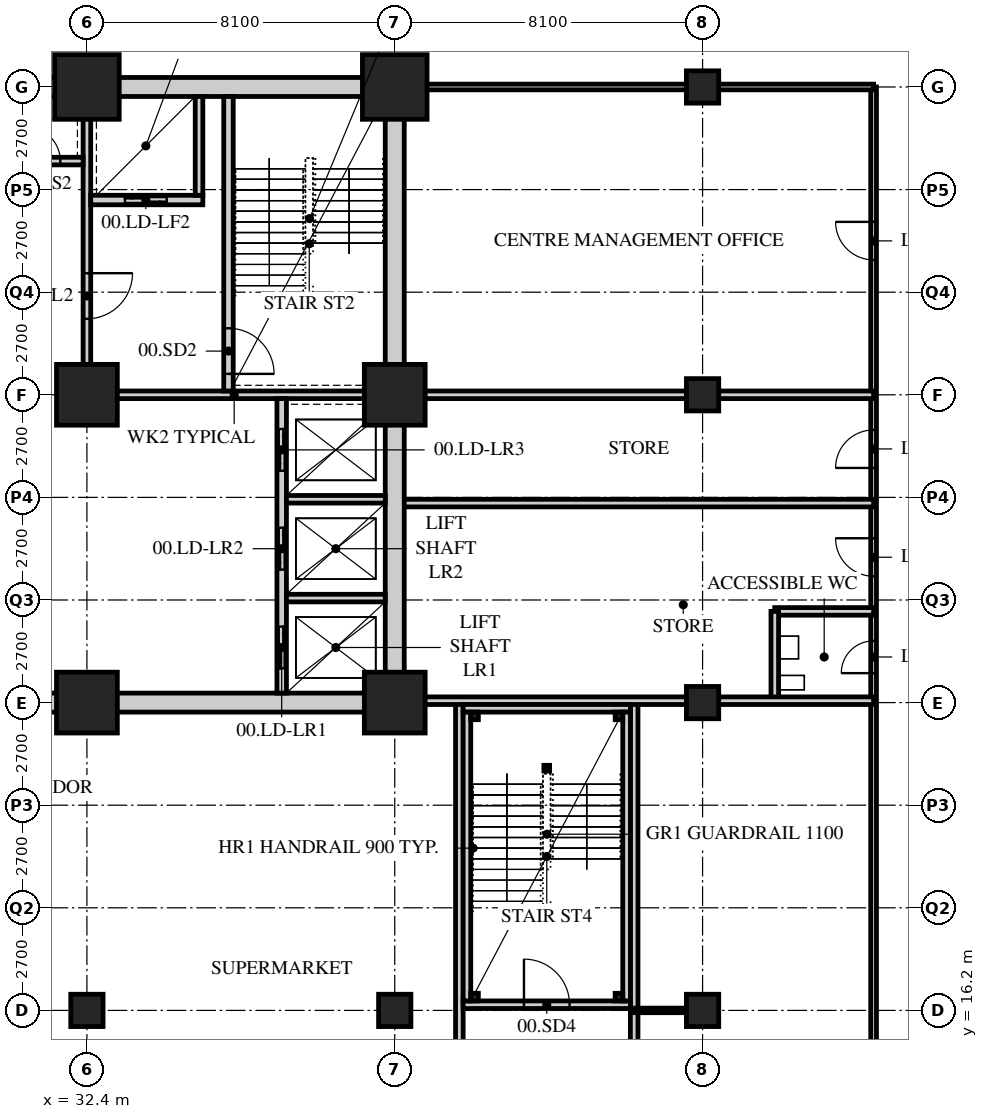
"""IFC4 building model, lengths in metres.
Left out: names, types, materials, properties, quantities, classifications, styles, units other than length and angle.
Written with IfcOpenShell. Run it as: python <this file> out.ifc"""

import sys

from ifc_helpers import new_model, si_unit, direction, frame, frame_2d, origin, origin_2d, place, context, subcontext, project, spatial, rectangle, hollow_rectangle, extrude, element, fill, save


model = new_model("IFC4")
c1 = context("Model", 3, precision=1e-05, world=origin(), true_north=direction((0.0, 1.0)))
c2 = subcontext(c1, "Body", "Model", "MODEL_VIEW")
j1 = project(units=[si_unit("LENGTHUNIT", "METRE"), si_unit("PLANEANGLEUNIT", "RADIAN")], contexts=[c1])
p1 = place(None, origin())
s1 = spatial("IfcSite", under=j1, at=p1, CompositionType="ELEMENT")
p2 = place(p1, origin())
s2 = spatial("IfcBuilding", under=s1, at=p2, CompositionType="ELEMENT")
p3 = place(p2, origin())
s3 = spatial("IfcBuildingStorey", under=s2, at=p3, CompositionType="ELEMENT", Elevation=0.0)
p4 = place(p3, frame((32.4, 16.2, 0.0), z_axis=(0.0, 0.0, 1.0), x_axis=(1.0, 0.0, 0.0)))
e1 = element("IfcColumn", 1, at=p4, inside=s3, PredefinedType="COLUMN", context=c2, shape_type="SweptSolid", body=[
    extrude(hollow_rectangle(XDim=0.85, YDim=0.85, WallThickness=0.085, at=origin_2d()), origin(), (0.0, 0.0, 1.0), 6.0),
])
for number, where, z_axis, x_axis in (
    (2, (32.4, 24.3, 0.0), (0.0, 0.0, 1.0), (1.0, 0.0, 0.0)),
    (3, (32.4, 32.4, 0.0), (0.0, 0.0, 1.0), (1.0, 0.0, 0.0)),
):
    element("IfcColumn", number, at=place(p3, frame(where, z_axis=z_axis, x_axis=x_axis)), inside=s3, PredefinedType="COLUMN", context=c2, shape_type="SweptSolid", body=[
        extrude(hollow_rectangle(XDim=1.6, YDim=1.6, WallThickness=0.15, at=origin_2d()), origin(), (0.0, 0.0, 1.0), 6.0),
    ])
p5 = place(p3, frame((32.4, 40.5, 0.0), z_axis=(0.0, 0.0, 1.0), x_axis=(1.0, 0.0, 0.0)))
e4 = element("IfcColumn", 4, at=p5, inside=s3, PredefinedType="COLUMN", context=c2, shape_type="SweptSolid", body=[
    extrude(hollow_rectangle(XDim=1.7, YDim=1.7, WallThickness=0.16, at=origin_2d()), origin(), (0.0, 0.0, 1.0), 6.0),
])
p6 = place(p3, frame((40.5, 16.2, 0.0), z_axis=(0.0, 0.0, 1.0), x_axis=(1.0, 0.0, 0.0)))
e5 = element("IfcColumn", 5, at=p6, inside=s3, PredefinedType="COLUMN", context=c2, shape_type="SweptSolid", body=[
    extrude(hollow_rectangle(XDim=0.85, YDim=0.85, WallThickness=0.085, at=origin_2d()), origin(), (0.0, 0.0, 1.0), 6.0),
])
for number, where, z_axis, x_axis in (
    (6, (40.5, 24.3, 0.0), (0.0, 0.0, 1.0), (1.0, 0.0, 0.0)),
    (7, (40.5, 32.4, 0.0), (0.0, 0.0, 1.0), (1.0, 0.0, 0.0)),
):
    element("IfcColumn", number, at=place(p3, frame(where, z_axis=z_axis, x_axis=x_axis)), inside=s3, PredefinedType="COLUMN", context=c2, shape_type="SweptSolid", body=[
        extrude(hollow_rectangle(XDim=1.6, YDim=1.6, WallThickness=0.15, at=origin_2d()), origin(), (0.0, 0.0, 1.0), 6.0),
    ])
p7 = place(p3, frame((40.5, 40.5, 0.0), z_axis=(0.0, 0.0, 1.0), x_axis=(1.0, 0.0, 0.0)))
e8 = element("IfcColumn", 8, at=p7, inside=s3, PredefinedType="COLUMN", context=c2, shape_type="SweptSolid", body=[
    extrude(hollow_rectangle(XDim=1.7, YDim=1.7, WallThickness=0.16, at=origin_2d()), origin(), (0.0, 0.0, 1.0), 6.0),
])
for number, where, z_axis, x_axis in (
    (9, (48.6, 16.2, 0.0), (0.0, 0.0, 1.0), (1.0, 0.0, 0.0)),
    (10, (48.6, 24.3, 0.0), (0.0, 0.0, 1.0), (1.0, 0.0, 0.0)),
    (11, (48.6, 32.4, 0.0), (0.0, 0.0, 1.0), (1.0, 0.0, 0.0)),
    (12, (48.6, 40.5, 0.0), (0.0, 0.0, 1.0), (1.0, 0.0, 0.0)),
):
    element("IfcColumn", number, at=place(p3, frame(where, z_axis=z_axis, x_axis=x_axis)), inside=s3, PredefinedType="COLUMN", context=c2, shape_type="SweptSolid", body=[
        extrude(hollow_rectangle(XDim=0.85, YDim=0.85, WallThickness=0.085, at=origin_2d()), origin(), (0.0, 0.0, 1.0), 6.0),
    ])
p8 = place(p3, frame((53.1, 3.6, 0.0), z_axis=(0.0, 0.0, 1.0), x_axis=(0.0, 1.0, 0.0)))
e13 = element("IfcWall", 13, at=p8, inside=s3, PredefinedType="PARTITIONING", context=c2, shape_type="SweptSolid", body=[
    extrude(rectangle(XDim=36.9, YDim=0.15, at=frame_2d((18.45, 0.0))), origin(), (0.0, 0.0, 1.0), 5.75),
])
p9 = place(p8, frame((21.475, 0.0, 0.0)))
e14 = element("IfcOpeningElement", 14, at=p9, cuts=e13, PredefinedType="OPENING", context=c2, shape_type="SweptSolid", body=[
    extrude(rectangle(XDim=0.85, YDim=2.1, at=frame_2d((0.425, 1.05))), frame((0.0, 0.085, 0.0), z_axis=(0.0, -1.0, 0.0), x_axis=(1.0, 0.0, 0.0)), (0.0, 0.0, 1.0), 0.17),
])
p10 = place(p8, frame((24.025, 0.0, 0.0)))
e15 = element("IfcOpeningElement", 15, at=p10, cuts=e13, PredefinedType="OPENING", context=c2, shape_type="SweptSolid", body=[
    extrude(rectangle(XDim=1.0, YDim=2.1, at=frame_2d((0.5, 1.05))), frame((0.0, 0.085, 0.0), z_axis=(0.0, -1.0, 0.0), x_axis=(1.0, 0.0, 0.0)), (0.0, 0.0, 1.0), 0.17),
])
p11 = place(p8, frame((26.875, 0.0, 0.0)))
e16 = element("IfcOpeningElement", 16, at=p11, cuts=e13, PredefinedType="OPENING", context=c2, shape_type="SweptSolid", body=[
    extrude(rectangle(XDim=1.0, YDim=2.1, at=frame_2d((0.5, 1.05))), frame((0.0, 0.085, 0.0), z_axis=(0.0, -1.0, 0.0), x_axis=(1.0, 0.0, 0.0)), (0.0, 0.0, 1.0), 0.17),
])
p12 = place(p8, frame((32.35, 0.0, 0.0)))
e17 = element("IfcOpeningElement", 17, at=p12, cuts=e13, PredefinedType="OPENING", context=c2, shape_type="SweptSolid", body=[
    extrude(rectangle(XDim=1.0, YDim=2.1, at=frame_2d((0.5, 1.05))), frame((0.0, 0.085, 0.0), z_axis=(0.0, -1.0, 0.0), x_axis=(1.0, 0.0, 0.0)), (0.0, 0.0, 1.0), 0.17),
])
p13 = place(p3, frame((53.1, 40.5, 0.0), z_axis=(0.0, 0.0, 1.0), x_axis=(-1.0, 0.0, 0.0)))
e18 = element("IfcWall", 18, at=p13, inside=s3, PredefinedType="PARTITIONING", context=c2, shape_type="SweptSolid", body=[
    extrude(rectangle(XDim=12.4, YDim=0.15, at=frame_2d((6.2, 0.0))), origin(), (0.0, 0.0, 1.0), 5.138),
])
p14 = place(p3, frame((40.5, 32.4, 0.0), z_axis=(0.0, 0.0, 1.0), x_axis=(1.0, 0.0, 0.0)))
e19 = element("IfcWall", 19, at=p14, inside=s3, PredefinedType="SOLIDWALL", context=c2, shape_type="SweptSolid", body=[
    extrude(rectangle(XDim=12.6, YDim=0.2, at=frame_2d((6.3, 0.0))), origin(), (0.0, 0.0, 1.0), 5.138),
])
p15 = place(p3, frame((53.1, 26.7, 0.0), z_axis=(0.0, 0.0, 1.0), x_axis=(-1.0, 0.0, 0.0)))
e20 = element("IfcWall", 20, at=p15, inside=s3, PredefinedType="SOLIDWALL", context=c2, shape_type="SweptSolid", body=[
    extrude(rectangle(XDim=2.6, YDim=0.2, at=frame_2d((1.3, 0.0))), origin(), (0.0, 0.0, 1.0), 5.75),
])
p16 = place(p3, frame((50.5, 24.3, 0.0), z_axis=(0.0, 0.0, 1.0), x_axis=(0.0, 1.0, 0.0)))
e21 = element("IfcWall", 21, at=p16, inside=s3, PredefinedType="SOLIDWALL", context=c2, shape_type="SweptSolid", body=[
    extrude(rectangle(XDim=2.4, YDim=0.2, at=frame_2d((1.2, 0.0))), origin(), (0.0, 0.0, 1.0), 5.75),
])
p17 = place(p3, frame((53.1, 29.55, 0.0), z_axis=(0.0, 0.0, 1.0), x_axis=(-1.0, 0.0, 0.0)))
e22 = element("IfcWall", 22, at=p17, inside=s3, PredefinedType="SOLIDWALL", context=c2, shape_type="SweptSolid", body=[
    extrude(rectangle(XDim=12.6, YDim=0.2, at=frame_2d((6.3, 0.0))), origin(), (0.0, 0.0, 1.0), 5.75),
])
for number, where, z_axis, x_axis in (
    (23, (42.2, 3.6, 0.0), (0.0, 0.0, 1.0), (0.0, 1.0, 0.0)),
    (24, (46.8, 3.6, 0.0), (0.0, 0.0, 1.0), (0.0, 1.0, 0.0)),
):
    element("IfcWall", number, at=place(p3, frame(where, z_axis=z_axis, x_axis=x_axis)), inside=s3, PredefinedType="SOLIDWALL", context=c2, shape_type="SweptSolid", body=[
        extrude(rectangle(XDim=20.7, YDim=0.2, at=frame_2d((10.35, 0.0))), origin(), (0.0, 0.0, 1.0), 5.75),
    ])
p18 = place(p3, frame((40.5, 24.35, 0.0), z_axis=(0.0, 0.0, 1.0), x_axis=(1.0, 0.0, 0.0)))
e25 = element("IfcWall", 25, at=p18, inside=s3, PredefinedType="SOLIDWALL", context=c2, shape_type="SweptSolid", body=[
    extrude(rectangle(XDim=12.6, YDim=0.2, at=frame_2d((6.3, 0.0))), origin(), (0.0, 0.0, 1.0), 5.138),
])
p19 = place(p3, frame((46.8, 16.2, 0.0), z_axis=(0.0, 0.0, 1.0), x_axis=(1.0, 0.0, 0.0)))
e26 = element("IfcWall", 26, at=p19, inside=s3, PredefinedType="PARTITIONING", context=c2, shape_type="SweptSolid", body=[
    extrude(rectangle(XDim=1.375, YDim=0.12, at=frame_2d((0.688, 0.0))), origin(), (0.0, 0.0, 1.0), 5.138),
])
p20 = place(p3, frame((15.95, 24.3, 0.0), z_axis=(0.0, 0.0, 1.0), x_axis=(1.0, 0.0, 0.0)))
e27 = element("IfcWall", 27, at=p20, inside=s3, PredefinedType="SOLIDWALL", context=c2, shape_type="SweptSolid", body=[
    extrude(rectangle(XDim=24.8, YDim=0.5, at=frame_2d((12.4, 0.0))), origin(), (0.0, 0.0, 1.0), 5.1),
])
p21 = place(p20, frame((11.5, 0.0, 0.0)))
e28 = element("IfcOpeningElement", 28, at=p21, cuts=e27, PredefinedType="OPENING", context=c2, shape_type="SweptSolid", body=[
    extrude(rectangle(XDim=1.8, YDim=2.4, at=frame_2d((0.9, 1.2))), frame((0.0, 0.26, 0.0), z_axis=(0.0, -1.0, 0.0), x_axis=(1.0, 0.0, 0.0)), (0.0, 0.0, 1.0), 0.52),
])
p22 = place(p3, frame((15.95, 40.5, 0.0), z_axis=(0.0, 0.0, 1.0), x_axis=(1.0, 0.0, 0.0)))
e29 = element("IfcWall", 29, at=p22, inside=s3, PredefinedType="SOLIDWALL", context=c2, shape_type="SweptSolid", body=[
    extrude(rectangle(XDim=24.8, YDim=0.5, at=frame_2d((12.4, 0.0))), origin(), (0.0, 0.0, 1.0), 5.1),
])
p23 = place(p22, frame((11.5, 0.0, 0.0)))
e30 = element("IfcOpeningElement", 30, at=p23, cuts=e29, PredefinedType="OPENING", context=c2, shape_type="SweptSolid", body=[
    extrude(rectangle(XDim=1.8, YDim=2.4, at=frame_2d((0.9, 1.2))), frame((0.0, 0.26, 0.0), z_axis=(0.0, -1.0, 0.0), x_axis=(1.0, 0.0, 0.0)), (0.0, 0.0, 1.0), 0.52),
])
p24 = place(p3, frame((40.5, 24.55, 0.0), z_axis=(0.0, 0.0, 1.0), x_axis=(0.0, 1.0, 0.0)))
e31 = element("IfcWall", 31, at=p24, inside=s3, PredefinedType="SOLIDWALL", context=c2, shape_type="SweptSolid", body=[
    extrude(rectangle(XDim=15.7, YDim=0.5, at=frame_2d((7.85, 0.0))), origin(), (0.0, 0.0, 1.0), 5.138),
])
p25 = place(p3, frame((32.3, 32.4, 0.0), z_axis=(0.0, 0.0, 1.0), x_axis=(1.0, 0.0, 0.0)))
e32 = element("IfcWall", 32, at=p25, inside=s3, PredefinedType="SOLIDWALL", context=c2, shape_type="SweptSolid", body=[
    extrude(rectangle(XDim=7.95, YDim=0.2, at=frame_2d((3.975, 0.0))), origin(), (0.0, 0.0, 1.0), 5.05),
])
p26 = place(p3, frame((32.4, 32.5, 0.0), z_axis=(0.0, 0.0, 1.0), x_axis=(0.0, 1.0, 0.0)))
e33 = element("IfcWall", 33, at=p26, inside=s3, PredefinedType="SOLIDWALL", context=c2, shape_type="SweptSolid", body=[
    extrude(rectangle(XDim=7.75, YDim=0.2, at=frame_2d((3.875, 0.0))), origin(), (0.0, 0.0, 1.0), 5.05),
])
p27 = place(p26, frame((1.9, 0.0, 0.0)))
e34 = element("IfcOpeningElement", 34, at=p27, cuts=e33, PredefinedType="OPENING", context=c2, shape_type="SweptSolid", body=[
    extrude(rectangle(XDim=1.2, YDim=2.1, at=frame_2d((0.6, 1.05))), frame((0.0, 0.11, 0.0), z_axis=(0.0, -1.0, 0.0), x_axis=(1.0, 0.0, 0.0)), (0.0, 0.0, 1.0), 0.22),
])
p28 = place(p3, frame((37.525, 24.55, 0.0), z_axis=(0.0, 0.0, 1.0), x_axis=(0.0, 1.0, 0.0)))
e35 = element("IfcWall", 35, at=p28, inside=s3, PredefinedType="SOLIDWALL", context=c2, shape_type="SweptSolid", body=[
    extrude(rectangle(XDim=7.75, YDim=0.25, at=frame_2d((3.875, 0.0))), origin(), (0.0, 0.0, 1.0), 5.75),
])
p29 = place(p28, frame((0.65, 0.0, 0.0)))
e36 = element("IfcOpeningElement", 36, at=p29, cuts=e35, PredefinedType="OPENING", context=c2, shape_type="SweptSolid", body=[
    extrude(rectangle(XDim=1.1, YDim=2.4, at=frame_2d((0.55, 1.2))), frame((0.0, 0.135, 0.0), z_axis=(0.0, -1.0, 0.0), x_axis=(1.0, 0.0, 0.0)), (0.0, 0.0, 1.0), 0.27),
])
p30 = place(p28, frame((3.25, 0.0, 0.0)))
e37 = element("IfcOpeningElement", 37, at=p30, cuts=e35, PredefinedType="OPENING", context=c2, shape_type="SweptSolid", body=[
    extrude(rectangle(XDim=1.1, YDim=2.4, at=frame_2d((0.55, 1.2))), frame((0.0, 0.135, 0.0), z_axis=(0.0, -1.0, 0.0), x_axis=(1.0, 0.0, 0.0)), (0.0, 0.0, 1.0), 0.27),
])
p31 = place(p28, frame((5.85, 0.0, 0.0)))
e38 = element("IfcOpeningElement", 38, at=p31, cuts=e35, PredefinedType="OPENING", context=c2, shape_type="SweptSolid", body=[
    extrude(rectangle(XDim=1.1, YDim=2.4, at=frame_2d((0.55, 1.2))), frame((0.0, 0.135, 0.0), z_axis=(0.0, -1.0, 0.0), x_axis=(1.0, 0.0, 0.0)), (0.0, 0.0, 1.0), 0.27),
])
for number, where, z_axis, x_axis in (
    (39, (37.65, 27.05, 0.0), (0.0, 0.0, 1.0), (1.0, 0.0, 0.0)),
    (40, (37.65, 29.65, 0.0), (0.0, 0.0, 1.0), (1.0, 0.0, 0.0)),
):
    element("IfcWall", number, at=place(p3, frame(where, z_axis=z_axis, x_axis=x_axis)), inside=s3, PredefinedType="SOLIDWALL", context=c2, shape_type="SweptSolid", body=[
        extrude(rectangle(XDim=2.6, YDim=0.2, at=frame_2d((1.3, 0.0))), origin(), (0.0, 0.0, 1.0), 5.75),
    ])
p32 = place(p3, frame((36.125, 32.5, 0.0), z_axis=(0.0, 0.0, 1.0), x_axis=(0.0, 1.0, 0.0)))
e41 = element("IfcWall", 41, at=p32, inside=s3, PredefinedType="SOLIDWALL", context=c2, shape_type="SweptSolid", body=[
    extrude(rectangle(XDim=7.75, YDim=0.25, at=frame_2d((3.875, 0.0))), origin(), (0.0, 0.0, 1.0), 5.75),
])
p33 = place(p32, frame((0.45, 0.0, 0.0)))
e42 = element("IfcOpeningElement", 42, at=p33, cuts=e41, PredefinedType="OPENING", context=c2, shape_type="SweptSolid", body=[
    extrude(rectangle(XDim=1.2, YDim=2.1, at=frame_2d((0.6, 1.05))), frame((0.0, 0.135, 0.0), z_axis=(0.0, -1.0, 0.0), x_axis=(1.0, 0.0, 0.0)), (0.0, 0.0, 1.0), 0.27),
])
p34 = place(p3, frame((32.5, 37.525, 0.0), z_axis=(0.0, 0.0, 1.0), x_axis=(1.0, 0.0, 0.0)))
e43 = element("IfcWall", 43, at=p34, inside=s3, PredefinedType="SOLIDWALL", context=c2, shape_type="SweptSolid", body=[
    extrude(rectangle(XDim=2.95, YDim=0.25, at=frame_2d((1.475, 0.0))), origin(), (0.0, 0.0, 1.0), 5.75),
])
p35 = place(p34, frame((0.9, 0.0, 0.0)))
e44 = element("IfcOpeningElement", 44, at=p35, cuts=e43, PredefinedType="OPENING", context=c2, shape_type="SweptSolid", body=[
    extrude(rectangle(XDim=1.1, YDim=2.4, at=frame_2d((0.55, 1.2))), frame((0.0, 0.135, 0.0), z_axis=(0.0, -1.0, 0.0), x_axis=(1.0, 0.0, 0.0)), (0.0, 0.0, 1.0), 0.27),
])
p36 = place(p3, frame((35.35, 37.65, 0.0), z_axis=(0.0, 0.0, 1.0), x_axis=(0.0, 1.0, 0.0)))
e45 = element("IfcWall", 45, at=p36, inside=s3, PredefinedType="SOLIDWALL", context=c2, shape_type="SweptSolid", body=[
    extrude(rectangle(XDim=2.6, YDim=0.2, at=frame_2d((1.3, 0.0))), origin(), (0.0, 0.0, 1.0), 5.75),
])
p37 = place(p3, frame((30.15, 38.55, 0.0), z_axis=(0.0, 0.0, 1.0), x_axis=(1.0, 0.0, 0.0)))
e46 = element("IfcWall", 46, at=p37, inside=s3, PredefinedType="SOLIDWALL", context=c2, shape_type="SweptSolid", body=[
    extrude(rectangle(XDim=2.15, YDim=0.2, at=frame_2d((1.075, 0.0))), origin(), (0.0, 0.0, 1.0), 5.75),
])
p38 = place(p37, frame((0.65, 0.0, 0.0)))
e47 = element("IfcOpeningElement", 47, at=p38, cuts=e46, PredefinedType="OPENING", context=c2, shape_type="SweptSolid", body=[
    extrude(rectangle(XDim=0.9, YDim=2.1, at=frame_2d((0.45, 1.05))), frame((0.0, 0.11, 0.0), z_axis=(0.0, -1.0, 0.0), x_axis=(1.0, 0.0, 0.0)), (0.0, 0.0, 1.0), 0.22),
])
p39 = place(p3, frame((42.3, 16.35, 0.0), z_axis=(0.0, 0.0, 1.0), x_axis=(1.0, 0.0, 0.0)))
e48 = element("IfcWall", 48, at=p39, inside=s3, PredefinedType="SOLIDWALL", context=c2, shape_type="SweptSolid", body=[
    extrude(rectangle(XDim=4.4, YDim=0.2, at=frame_2d((2.2, 0.0))), origin(), (0.0, 0.0, 1.0), 5.138),
])
p40 = place(p39, frame((1.6, 0.0, 0.0)))
e49 = element("IfcOpeningElement", 49, at=p40, cuts=e48, PredefinedType="OPENING", context=c2, shape_type="SweptSolid", body=[
    extrude(rectangle(XDim=1.2, YDim=2.1, at=frame_2d((0.6, 1.05))), frame((0.0, 0.11, 0.0), z_axis=(0.0, -1.0, 0.0), x_axis=(1.0, 0.0, 0.0)), (0.0, 0.0, 1.0), 0.22),
])
p41 = place(p3, frame((42.3, 24.15, 0.0), z_axis=(0.0, 0.0, 1.0), x_axis=(1.0, 0.0, 0.0)))
e50 = element("IfcWall", 50, at=p41, inside=s3, PredefinedType="SOLIDWALL", context=c2, shape_type="SweptSolid", body=[
    extrude(rectangle(XDim=4.4, YDim=0.2, at=frame_2d((2.2, 0.0))), origin(), (0.0, 0.0, 1.0), 5.138),
])
for number, where, z_axis, x_axis in (
    (51, (42.4, 16.45, 0.0), (0.0, 0.0, 1.0), (0.0, 1.0, 0.0)),
    (52, (46.6, 16.45, 0.0), (0.0, 0.0, 1.0), (0.0, 1.0, 0.0)),
):
    element("IfcWall", number, at=place(p3, frame(where, z_axis=z_axis, x_axis=x_axis)), inside=s3, PredefinedType="SOLIDWALL", context=c2, shape_type="SweptSolid", body=[
        extrude(rectangle(XDim=7.6, YDim=0.2, at=frame_2d((3.8, 0.0))), origin(), (0.0, 0.0, 1.0), 5.75),
    ])
for number, where, z_axis, x_axis in (
    (53, (42.6, 23.95, 0.0), (0.0, 0.0, 1.0), (1.0, 0.0, 0.0)),
    (54, (46.4, 23.95, 0.0), (0.0, 0.0, 1.0), (1.0, 0.0, 0.0)),
    (55, (42.6, 16.55, 0.0), (0.0, 0.0, 1.0), (1.0, 0.0, 0.0)),
    (56, (46.4, 16.55, 0.0), (0.0, 0.0, 1.0), (1.0, 0.0, 0.0)),
):
    element("IfcColumn", number, at=place(p3, frame(where, z_axis=z_axis, x_axis=x_axis)), inside=s3, PredefinedType="COLUMN", context=c2, shape_type="SweptSolid", body=[
        extrude(hollow_rectangle(XDim=0.2, YDim=0.2, WallThickness=0.012, at=origin_2d()), origin(), (0.0, 0.0, 1.0), 6.0),
    ])
p42 = place(p3, frame((44.5, 22.575, 0.0), z_axis=(0.0, 0.0, 1.0), x_axis=(1.0, 0.0, 0.0)))
e57 = element("IfcColumn", 57, at=p42, inside=s3, PredefinedType="COLUMN", context=c2, shape_type="SweptSolid", body=[
    extrude(hollow_rectangle(XDim=0.15, YDim=0.15, WallThickness=0.01, at=origin_2d()), origin(), (0.0, 0.0, 1.0), 6.0),
])
p43 = place(p9, origin())
e58 = element("IfcDoor", 58, at=p43, inside=s3, OperationType="SINGLE_SWING_LEFT", PredefinedType="DOOR", context=c2, shape_type="SweptSolid", body=[
    extrude(rectangle(XDim=0.85, YDim=2.1, at=frame_2d((0.425, 1.05))), frame((0.0, 0.025, 0.0), z_axis=(0.0, -1.0, 0.0), x_axis=(1.0, 0.0, 0.0)), (0.0, 0.0, 1.0), 0.05),
])
fill(e14, e58)
p44 = place(p10, origin())
e59 = element("IfcDoor", 59, at=p44, inside=s3, OperationType="SINGLE_SWING_RIGHT", PredefinedType="DOOR", context=c2, shape_type="SweptSolid", body=[
    extrude(rectangle(XDim=1.0, YDim=2.1, at=frame_2d((0.5, 1.05))), frame((0.0, 0.025, 0.0), z_axis=(0.0, -1.0, 0.0), x_axis=(1.0, 0.0, 0.0)), (0.0, 0.0, 1.0), 0.05),
])
fill(e15, e59)
p45 = place(p11, origin())
e60 = element("IfcDoor", 60, at=p45, inside=s3, OperationType="SINGLE_SWING_LEFT", PredefinedType="DOOR", context=c2, shape_type="SweptSolid", body=[
    extrude(rectangle(XDim=1.0, YDim=2.1, at=frame_2d((0.5, 1.05))), frame((0.0, 0.025, 0.0), z_axis=(0.0, -1.0, 0.0), x_axis=(1.0, 0.0, 0.0)), (0.0, 0.0, 1.0), 0.05),
])
fill(e16, e60)
p46 = place(p12, origin())
e61 = element("IfcDoor", 61, at=p46, inside=s3, OperationType="SINGLE_SWING_RIGHT", PredefinedType="DOOR", context=c2, shape_type="SweptSolid", body=[
    extrude(rectangle(XDim=1.0, YDim=2.1, at=frame_2d((0.5, 1.05))), frame((0.0, 0.025, 0.0), z_axis=(0.0, -1.0, 0.0), x_axis=(1.0, 0.0, 0.0)), (0.0, 0.0, 1.0), 0.05),
])
fill(e17, e61)
p47 = place(p33, origin())
e62 = element("IfcDoor", 62, at=p47, inside=s3, OperationType="SINGLE_SWING_RIGHT", PredefinedType="DOOR", context=c2, shape_type="SweptSolid", body=[
    extrude(rectangle(XDim=1.2, YDim=2.1, at=frame_2d((0.6, 1.05))), frame((0.0, 0.025, 0.0), z_axis=(0.0, -1.0, 0.0), x_axis=(1.0, 0.0, 0.0)), (0.0, 0.0, 1.0), 0.05),
])
fill(e42, e62)
p48 = place(p27, origin())
e63 = element("IfcDoor", 63, at=p48, inside=s3, OperationType="SINGLE_SWING_LEFT", PredefinedType="DOOR", context=c2, shape_type="SweptSolid", body=[
    extrude(rectangle(XDim=1.2, YDim=2.1, at=frame_2d((0.6, 1.05))), frame((0.0, 0.025, 0.0), z_axis=(0.0, -1.0, 0.0), x_axis=(1.0, 0.0, 0.0)), (0.0, 0.0, 1.0), 0.05),
])
fill(e34, e63)
p49 = place(p38, origin())
e64 = element("IfcDoor", 64, at=p49, inside=s3, OperationType="SINGLE_SWING_LEFT", PredefinedType="DOOR", context=c2, shape_type="SweptSolid", body=[
    extrude(rectangle(XDim=0.9, YDim=2.1, at=frame_2d((0.45, 1.05))), frame((0.0, 0.025, 0.0), z_axis=(0.0, -1.0, 0.0), x_axis=(1.0, 0.0, 0.0)), (0.0, 0.0, 1.0), 0.05),
])
fill(e47, e64)
p50 = place(p29, origin())
e65 = element("IfcDoor", 65, at=p50, inside=s3, OperationType="DOUBLE_DOOR_SLIDING", PredefinedType="DOOR", context=c2, shape_type="SweptSolid", body=[
    extrude(rectangle(XDim=1.1, YDim=2.4, at=frame_2d((0.55, 1.2))), frame((0.0, 0.025, 0.0), z_axis=(0.0, -1.0, 0.0), x_axis=(1.0, 0.0, 0.0)), (0.0, 0.0, 1.0), 0.05),
])
fill(e36, e65)
p51 = place(p30, origin())
e66 = element("IfcDoor", 66, at=p51, inside=s3, OperationType="DOUBLE_DOOR_SLIDING", PredefinedType="DOOR", context=c2, shape_type="SweptSolid", body=[
    extrude(rectangle(XDim=1.1, YDim=2.4, at=frame_2d((0.55, 1.2))), frame((0.0, 0.025, 0.0), z_axis=(0.0, -1.0, 0.0), x_axis=(1.0, 0.0, 0.0)), (0.0, 0.0, 1.0), 0.05),
])
fill(e37, e66)
p52 = place(p31, origin())
e67 = element("IfcDoor", 67, at=p52, inside=s3, OperationType="DOUBLE_DOOR_SLIDING", PredefinedType="DOOR", context=c2, shape_type="SweptSolid", body=[
    extrude(rectangle(XDim=1.1, YDim=2.4, at=frame_2d((0.55, 1.2))), frame((0.0, 0.025, 0.0), z_axis=(0.0, -1.0, 0.0), x_axis=(1.0, 0.0, 0.0)), (0.0, 0.0, 1.0), 0.05),
])
fill(e38, e67)
p53 = place(p35, origin())
e68 = element("IfcDoor", 68, at=p53, inside=s3, OperationType="DOUBLE_DOOR_SLIDING", PredefinedType="DOOR", context=c2, shape_type="SweptSolid", body=[
    extrude(rectangle(XDim=1.1, YDim=2.4, at=frame_2d((0.55, 1.2))), frame((0.0, 0.025, 0.0), z_axis=(0.0, -1.0, 0.0), x_axis=(1.0, 0.0, 0.0)), (0.0, 0.0, 1.0), 0.05),
])
fill(e44, e68)
p54 = place(p40, origin())
e69 = element("IfcDoor", 69, at=p54, inside=s3, OperationType="SINGLE_SWING_LEFT", PredefinedType="DOOR", context=c2, shape_type="SweptSolid", body=[
    extrude(rectangle(XDim=1.2, YDim=2.1, at=frame_2d((0.6, 1.05))), frame((0.0, 0.025, 0.0), z_axis=(0.0, -1.0, 0.0), x_axis=(1.0, 0.0, 0.0)), (0.0, 0.0, 1.0), 0.05),
])
fill(e49, e69)
save(model, sys.argv[1])
